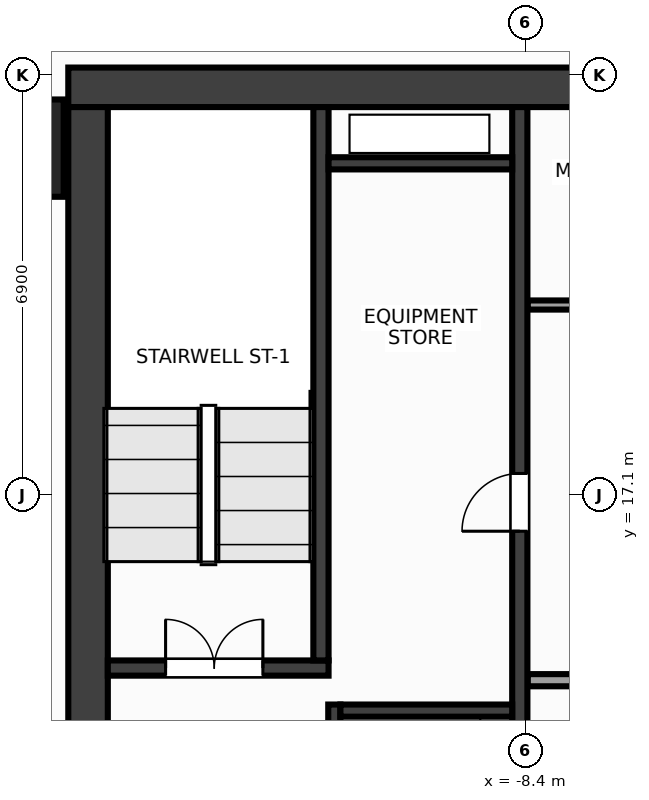
"""IFC4 building model, lengths in metres.
Left out: names, types, materials, properties, quantities, classifications, styles, units other than length and angle.
Written with IfcOpenShell. Run it as: python <this file> out.ifc"""

import sys

from ifc_helpers import new_model, si_unit, direction, frame, frame_2d, origin, origin_2d, place, context, subcontext, project, spatial, rectangle, extrude, source, transform, mapped, element, fill, save


model = new_model("IFC4")
c1 = context("Model", 3, precision=1e-05, world=origin(), true_north=direction((0.0, 1.0)))
c2 = subcontext(c1, "Body", "Model", "MODEL_VIEW")
j1 = project(units=[si_unit("LENGTHUNIT", "METRE"), si_unit("PLANEANGLEUNIT", "RADIAN")], contexts=[c1])
p1 = place(None, origin())
s1 = spatial("IfcSite", under=j1, at=p1, CompositionType="ELEMENT")
p2 = place(p1, origin())
s2 = spatial("IfcBuilding", under=s1, at=p2, CompositionType="ELEMENT")
p3 = place(p2, frame((0.0, 0.0, 106.4)))
s3 = spatial("IfcBuildingStorey", under=s2, at=p3, CompositionType="ELEMENT", Elevation=106.4)
m1 = source(origin(), c2, "Body", "SweptSolid", [
    extrude(rectangle(XDim=31.85, YDim=0.65, at=frame_2d((15.925, 0.0))), origin(), (0.0, 0.0, 1.0), 3.6),
])
p4 = place(p3, frame((-15.925, 23.8, 0.0), z_axis=(0.0, 0.0, 1.0), x_axis=(1.0, 0.0, 0.0)))
e1 = element("IfcWall", 1, at=p4, inside=s3, PredefinedType="SHEAR", context=c2, shape_type="MappedRepresentation", body=[
    mapped(m1, transform((0.0, 0.0, 0.0), x_axis=(1.0, 0.0, 0.0), y_axis=(0.0, 1.0, 0.0), z_axis=(0.0, 0.0, 1.0), scale=1.0)),
])
m2 = source(origin(), c2, "Body", "SweptSolid", [
    extrude(rectangle(XDim=12.95, YDim=0.65, at=frame_2d((6.475, 0.0))), origin(), (0.0, 0.0, 1.0), 3.6),
])
p5 = place(p3, frame((-15.6, 10.525, 0.0), z_axis=(0.0, 0.0, 1.0), x_axis=(0.0, 1.0, 0.0)))
e2 = element("IfcWall", 2, at=p5, inside=s3, PredefinedType="SHEAR", context=c2, shape_type="MappedRepresentation", body=[
    mapped(m2, transform((0.0, 0.0, 0.0), x_axis=(1.0, 0.0, 0.0), y_axis=(0.0, 1.0, 0.0), z_axis=(0.0, 0.0, 1.0), scale=1.0)),
])
m3 = source(origin(), c2, "Body", "SweptSolid", [
    extrude(rectangle(XDim=12.95, YDim=0.25, at=frame_2d((6.475, 0.0))), origin(), (0.0, 0.0, 1.0), 3.6),
])
p6 = place(p3, frame((-8.5, 10.525, 0.0), z_axis=(0.0, 0.0, 1.0), x_axis=(0.0, 1.0, 0.0)))
e3 = element("IfcWall", 3, at=p6, inside=s3, PredefinedType="SHEAR", context=c2, shape_type="MappedRepresentation", body=[
    mapped(m3, transform((0.0, 0.0, 0.0), x_axis=(1.0, 0.0, 0.0), y_axis=(0.0, 1.0, 0.0), z_axis=(0.0, 0.0, 1.0), scale=1.0)),
])
p7 = place(p6, frame((5.975, 0.0, 0.0)))
e4 = element("IfcOpeningElement", 4, at=p7, cuts=e3, PredefinedType="OPENING", context=c2, shape_type="SweptSolid", body=[
    extrude(rectangle(XDim=0.95, YDim=2.15, at=frame_2d((0.475, 1.075))), frame((0.0, 0.137, 0.0), z_axis=(0.0, -1.0, 0.0), x_axis=(1.0, 0.0, 0.0)), (0.0, 0.0, 1.0), 0.274),
])
m4 = source(origin(), c2, "Body", "SweptSolid", [
    extrude(rectangle(XDim=3.63, YDim=0.25, at=frame_2d((1.815, 0.0))), origin(), (0.0, 0.0, 1.0), 3.6),
])
p8 = place(p3, frame((-15.275, 14.25, 0.0), z_axis=(0.0, 0.0, 1.0), x_axis=(1.0, 0.0, 0.0)))
e5 = element("IfcWall", 5, at=p8, inside=s3, PredefinedType="SHEAR", context=c2, shape_type="MappedRepresentation", body=[
    mapped(m4, transform((0.0, 0.0, 0.0), x_axis=(1.0, 0.0, 0.0), y_axis=(0.0, 1.0, 0.0), z_axis=(0.0, 0.0, 1.0), scale=1.0)),
])
p9 = place(p8, frame((0.95, 0.0, 0.0)))
e6 = element("IfcOpeningElement", 6, at=p9, cuts=e5, PredefinedType="OPENING", context=c2, shape_type="SweptSolid", body=[
    extrude(rectangle(XDim=1.6, YDim=2.15, at=frame_2d((0.8, 1.075))), frame((0.0, 0.137, 0.0), z_axis=(0.0, -1.0, 0.0), x_axis=(1.0, 0.0, 0.0)), (0.0, 0.0, 1.0), 0.274),
])
m5 = source(origin(), c2, "Body", "SweptSolid", [
    extrude(rectangle(XDim=9.1, YDim=0.25, at=frame_2d((4.55, 0.0))), origin(), (0.0, 0.0, 1.0), 3.6),
])
p10 = place(p3, frame((-11.77, 14.375, 0.0), z_axis=(0.0, 0.0, 1.0), x_axis=(0.0, 1.0, 0.0)))
e7 = element("IfcWall", 7, at=p10, inside=s3, PredefinedType="SHEAR", context=c2, shape_type="MappedRepresentation", body=[
    mapped(m5, transform((0.0, 0.0, 0.0), x_axis=(1.0, 0.0, 0.0), y_axis=(0.0, 1.0, 0.0), z_axis=(0.0, 0.0, 1.0), scale=1.0)),
])
m6 = source(origin(), c2, "Body", "SweptSolid", [
    extrude(rectangle(XDim=3.125, YDim=0.2, at=frame_2d((1.562, 0.0))), origin(), (0.0, 0.0, 1.0), 3.6),
])
p11 = place(p3, frame((-11.55, 10.525, 0.0), z_axis=(0.0, 0.0, 1.0), x_axis=(0.0, 1.0, 0.0)))
e8 = element("IfcWall", 8, at=p11, inside=s3, PredefinedType="SHEAR", context=c2, shape_type="MappedRepresentation", body=[
    mapped(m6, transform((0.0, 0.0, 0.0), x_axis=(1.0, 0.0, 0.0), y_axis=(0.0, 1.0, 0.0), z_axis=(0.0, 0.0, 1.0), scale=1.0)),
])
p12 = place(p11, frame((0.9, 0.0, 0.0)))
e9 = element("IfcOpeningElement", 9, at=p12, cuts=e8, PredefinedType="OPENING", context=c2, shape_type="SweptSolid", body=[
    extrude(rectangle(XDim=1.1, YDim=2.15, at=frame_2d((0.55, 1.075))), frame((0.0, 0.112, 0.0), z_axis=(0.0, -1.0, 0.0), x_axis=(1.0, 0.0, 0.0)), (0.0, 0.0, 1.0), 0.224),
])
m7 = source(origin(), c2, "Body", "SweptSolid", [
    extrude(rectangle(XDim=2.825, YDim=0.2, at=frame_2d((1.413, 0.0))), origin(), (0.0, 0.0, 1.0), 3.6),
])
p13 = place(p3, frame((-11.45, 13.55, 0.0), z_axis=(0.0, 0.0, 1.0), x_axis=(1.0, 0.0, 0.0)))
e10 = element("IfcWall", 10, at=p13, inside=s3, PredefinedType="SHEAR", context=c2, shape_type="MappedRepresentation", body=[
    mapped(m7, transform((0.0, 0.0, 0.0), x_axis=(1.0, 0.0, 0.0), y_axis=(0.0, 1.0, 0.0), z_axis=(0.0, 0.0, 1.0), scale=1.0)),
])
m8 = source(origin(), c2, "Body", "SweptSolid", [
    extrude(rectangle(XDim=3.02, YDim=0.2, at=frame_2d((1.51, 0.0))), origin(), (0.0, 0.0, 1.0), 3.6),
])
p14 = place(p3, frame((-11.645, 22.55, 0.0), z_axis=(0.0, 0.0, 1.0), x_axis=(1.0, 0.0, 0.0)))
e11 = element("IfcWall", 11, at=p14, inside=s3, PredefinedType="SHEAR", context=c2, shape_type="MappedRepresentation", body=[
    mapped(m8, transform((0.0, 0.0, 0.0), x_axis=(1.0, 0.0, 0.0), y_axis=(0.0, 1.0, 0.0), z_axis=(0.0, 0.0, 1.0), scale=1.0)),
])
m9 = source(origin(), c2, "Body", "SweptSolid", [
    extrude(rectangle(XDim=1.6, YDim=1.6, at=origin_2d()), origin(), (0.0, 0.0, 1.0), 3.6),
])
p15 = place(p3, frame((-16.8, 22.8, 0.0), z_axis=(0.0, 0.0, 1.0), x_axis=(1.0, 0.0, 0.0)))
e12 = element("IfcColumn", 12, at=p15, inside=s3, PredefinedType="COLUMN", context=c2, shape_type="MappedRepresentation", body=[
    mapped(m9, transform((0.0, 0.0, 0.0), x_axis=(1.0, 0.0, 0.0), y_axis=(0.0, 1.0, 0.0), z_axis=(0.0, 0.0, 1.0), scale=1.0)),
])
m10 = source(origin(), c2, "Body", "SweptSolid", [
    extrude(rectangle(XDim=7.07, YDim=0.2, at=frame_2d((3.535, 0.0))), origin(), (0.0, 0.0, 1.0), 3.36),
])
p16 = place(p3, frame((-8.37, 14.05, 0.0), z_axis=(0.0, 0.0, 1.0), x_axis=(1.0, 0.0, 0.0)))
e13 = element("IfcWall", 13, at=p16, inside=s3, PredefinedType="PARTITIONING", context=c2, shape_type="MappedRepresentation", body=[
    mapped(m10, transform((0.0, 0.0, 0.0), x_axis=(1.0, 0.0, 0.0), y_axis=(0.0, 1.0, 0.0), z_axis=(0.0, 0.0, 1.0), scale=1.0)),
])
p17 = place(p16, frame((2.8, 0.0, 0.0)))
e14 = element("IfcOpeningElement", 14, at=p17, cuts=e13, PredefinedType="OPENING", context=c2, shape_type="SweptSolid", body=[
    extrude(rectangle(XDim=0.98, YDim=2.15, at=frame_2d((0.49, 1.075))), frame((0.0, 0.112, 0.0), z_axis=(0.0, -1.0, 0.0), x_axis=(1.0, 0.0, 0.0)), (0.0, 0.0, 1.0), 0.224),
])
m11 = source(origin(), c2, "Body", "SweptSolid", [
    extrude(rectangle(XDim=14.59, YDim=0.15, at=frame_2d((7.295, 0.0))), origin(), (0.0, 0.0, 1.0), 3.36),
])
p18 = place(p3, frame((-8.37, 20.22, 0.0), z_axis=(0.0, 0.0, 1.0), x_axis=(1.0, 0.0, 0.0)))
e15 = element("IfcWall", 15, at=p18, inside=s3, PredefinedType="PARTITIONING", context=c2, shape_type="MappedRepresentation", body=[
    mapped(m11, transform((0.0, 0.0, 0.0), x_axis=(1.0, 0.0, 0.0), y_axis=(0.0, 1.0, 0.0), z_axis=(0.0, 0.0, 1.0), scale=1.0)),
])
p19 = place(p18, frame((1.36, 0.0, 0.0)))
e16 = element("IfcOpeningElement", 16, at=p19, cuts=e15, PredefinedType="OPENING", context=c2, shape_type="SweptSolid", body=[
    extrude(rectangle(XDim=0.9, YDim=2.15, at=frame_2d((0.45, 1.075))), frame((0.0, 0.087, 0.0), z_axis=(0.0, -1.0, 0.0), x_axis=(1.0, 0.0, 0.0)), (0.0, 0.0, 1.0), 0.174),
])
p20 = place(p18, frame((4.92, 0.0, 0.0)))
e17 = element("IfcOpeningElement", 17, at=p20, cuts=e15, PredefinedType="OPENING", context=c2, shape_type="SweptSolid", body=[
    extrude(rectangle(XDim=0.9, YDim=2.15, at=frame_2d((0.45, 1.075))), frame((0.0, 0.087, 0.0), z_axis=(0.0, -1.0, 0.0), x_axis=(1.0, 0.0, 0.0)), (0.0, 0.0, 1.0), 0.174),
])
p21 = place(p18, frame((10.37, 0.0, 0.0)))
e18 = element("IfcOpeningElement", 18, at=p21, cuts=e15, PredefinedType="OPENING", context=c2, shape_type="SweptSolid", body=[
    extrude(rectangle(XDim=0.9, YDim=2.15, at=frame_2d((0.45, 1.075))), frame((0.0, 0.087, 0.0), z_axis=(0.0, -1.0, 0.0), x_axis=(1.0, 0.0, 0.0)), (0.0, 0.0, 1.0), 0.174),
])
m12 = source(origin(), c2, "Body", "SweptSolid", [
    extrude(rectangle(XDim=1.6, YDim=2.15, at=frame_2d((0.8, 1.075))), frame((0.0, 0.025, 0.0), z_axis=(0.0, -1.0, 0.0), x_axis=(1.0, 0.0, 0.0)), (0.0, 0.0, 1.0), 0.05),
])
p22 = place(p9, origin())
e19 = element("IfcDoor", 19, at=p22, inside=s3, OperationType="DOUBLE_DOOR_SINGLE_SWING", PredefinedType="DOOR", context=c2, shape_type="MappedRepresentation", body=[
    mapped(m12, transform((0.0, 0.0, 0.0), x_axis=(1.0, 0.0, 0.0), y_axis=(0.0, 1.0, 0.0), z_axis=(0.0, 0.0, 1.0), scale=1.0)),
])
fill(e6, e19)
m13 = source(origin(), c2, "Body", "SweptSolid", [
    extrude(rectangle(XDim=0.95, YDim=2.15, at=frame_2d((0.475, 1.075))), frame((0.0, 0.025, 0.0), z_axis=(0.0, -1.0, 0.0), x_axis=(1.0, 0.0, 0.0)), (0.0, 0.0, 1.0), 0.05),
])
p23 = place(p7, origin())
e20 = element("IfcDoor", 20, at=p23, inside=s3, OperationType="SINGLE_SWING_LEFT", PredefinedType="DOOR", context=c2, shape_type="MappedRepresentation", body=[
    mapped(m13, transform((0.0, 0.0, 0.0), x_axis=(1.0, 0.0, 0.0), y_axis=(0.0, 1.0, 0.0), z_axis=(0.0, 0.0, 1.0), scale=1.0)),
])
fill(e4, e20)
save(model, sys.argv[1])
